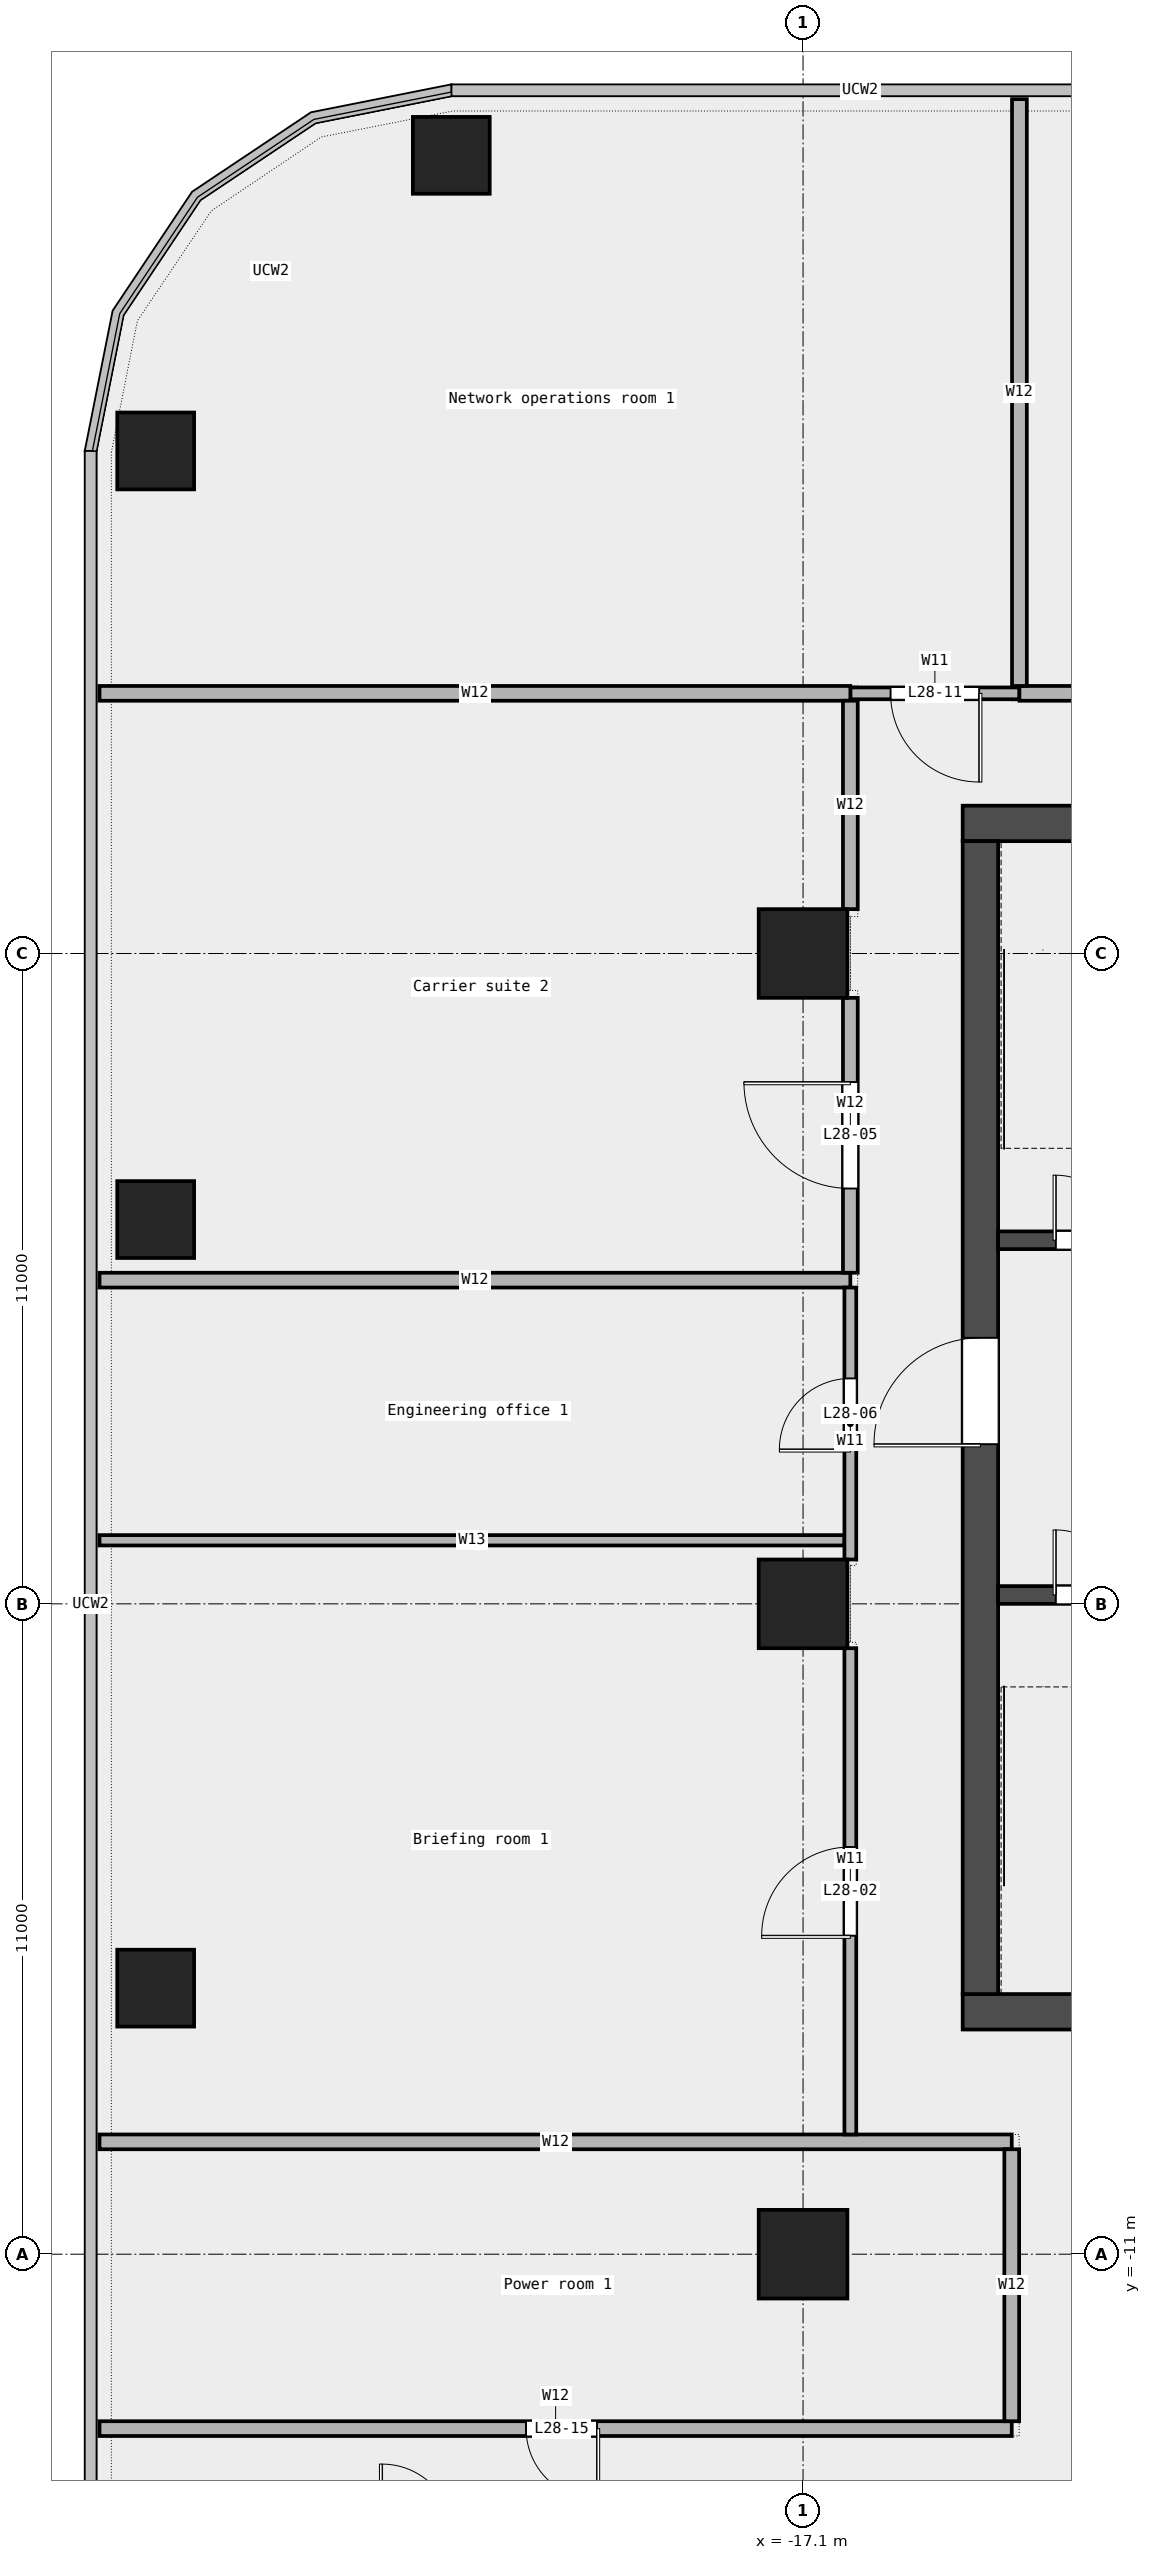
"""IFC4 building model, lengths in metres.
Left out: names, types, materials, properties, quantities, classifications, styles, units other than length and angle.
Written with IfcOpenShell. Run it as: python <this file> out.ifc"""

import sys

from ifc_helpers import new_model, si_unit, direction, frame, frame_2d, origin, origin_2d, place, context, subcontext, project, spatial, rectangle, extrude, element, fill, save


model = new_model("IFC4")
c1 = context("Model", 3, precision=1e-05, world=origin(), true_north=direction((0.0, 1.0)))
c2 = subcontext(c1, "Body", "Model", "MODEL_VIEW")
j1 = project(units=[si_unit("LENGTHUNIT", "METRE"), si_unit("PLANEANGLEUNIT", "RADIAN")], contexts=[c1])
p1 = place(None, origin())
s1 = spatial("IfcSite", under=j1, at=p1, CompositionType="ELEMENT")
p2 = place(p1, origin())
s2 = spatial("IfcBuilding", under=s1, at=p2, CompositionType="ELEMENT")
p3 = place(p2, frame((0.0, 0.0, 139.6)))
s3 = spatial("IfcBuildingStorey", under=s2, at=p3, CompositionType="ELEMENT", Elevation=139.6)
for number, where, z_axis, x_axis in (
    (1, (-23.05, 24.5, 0.0), (0.0, 0.0, 1.0), (1.0, 0.0, 0.0)),
    (2, (-28.05, 19.5, 0.0), (0.0, 0.0, 1.0), (1.0, 0.0, 0.0)),
    (3, (-28.05, 6.5, 0.0), (0.0, 0.0, 1.0), (1.0, 0.0, 0.0)),
    (4, (-28.05, -6.5, 0.0), (0.0, 0.0, 1.0), (1.0, 0.0, 0.0)),
):
    element("IfcColumn", number, at=place(p3, frame(where, z_axis=z_axis, x_axis=x_axis)), inside=s3, PredefinedType="COLUMN", context=c2, shape_type="SweptSolid", body=[
        extrude(rectangle(XDim=1.3, YDim=1.3, at=origin_2d()), origin(), (0.0, 0.0, 1.0), 4.05),
    ])
for number, where, z_axis, x_axis in (
    (5, (-17.1, -11.0, 0.0), (0.0, 0.0, 1.0), (1.0, 0.0, 0.0)),
    (6, (-17.1, 0.0, 0.0), (0.0, 0.0, 1.0), (1.0, 0.0, 0.0)),
    (7, (-17.1, 11.0, 0.0), (0.0, 0.0, 1.0), (1.0, 0.0, 0.0)),
):
    element("IfcColumn", number, at=place(p3, frame(where, z_axis=z_axis, x_axis=x_axis)), inside=s3, PredefinedType="COLUMN", context=c2, shape_type="SweptSolid", body=[
        extrude(rectangle(XDim=1.5, YDim=1.5, at=origin_2d()), origin(), (0.0, 0.0, 1.0), 4.05),
    ])
p4 = place(p3, frame((-29.0, -13.95, 0.0), z_axis=(0.0, 0.0, 1.0), x_axis=(1.0, 0.0, 0.0)))
e8 = element("IfcWall", 8, at=p4, inside=s3, PredefinedType="PARTITIONING", context=c2, shape_type="SweptSolid", body=[
    extrude(rectangle(XDim=15.43, YDim=0.25, at=frame_2d((7.715, 0.0))), origin(), (0.0, 0.0, 1.0), 4.05),
])
p5 = place(p4, frame((7.215, 0.0, 0.0)))
e9 = element("IfcOpeningElement", 9, at=p5, cuts=e8, PredefinedType="OPENING", context=c2, shape_type="SweptSolid", body=[
    extrude(rectangle(XDim=1.2, YDim=2.1, at=frame_2d((0.6, 1.05))), frame((0.0, 0.137, 0.0), z_axis=(0.0, -1.0, 0.0), x_axis=(1.0, 0.0, 0.0)), (0.0, 0.0, 1.0), 0.274),
])
p6 = place(p3, frame((-29.0, -9.1, 0.0), z_axis=(0.0, 0.0, 1.0), x_axis=(1.0, 0.0, 0.0)))
e10 = element("IfcWall", 10, at=p6, inside=s3, PredefinedType="PARTITIONING", context=c2, shape_type="SweptSolid", body=[
    extrude(rectangle(XDim=15.43, YDim=0.25, at=frame_2d((7.715, 0.0))), origin(), (0.0, 0.0, 1.0), 4.05),
])
p7 = place(p3, frame((-29.0, 1.075, 0.0), z_axis=(0.0, 0.0, 1.0), x_axis=(1.0, 0.0, 0.0)))
e11 = element("IfcWall", 11, at=p7, inside=s3, PredefinedType="PARTITIONING", context=c2, shape_type="SweptSolid", body=[
    extrude(rectangle(XDim=12.6, YDim=0.175, at=frame_2d((6.3, 0.0))), origin(), (0.0, 0.0, 1.0), 4.05),
])
p8 = place(p3, frame((-29.0, 5.475, 0.0), z_axis=(0.0, 0.0, 1.0), x_axis=(1.0, 0.0, 0.0)))
e12 = element("IfcWall", 12, at=p8, inside=s3, PredefinedType="PARTITIONING", context=c2, shape_type="SweptSolid", body=[
    extrude(rectangle(XDim=12.7, YDim=0.25, at=frame_2d((6.35, 0.0))), origin(), (0.0, 0.0, 1.0), 4.05),
])
p9 = place(p3, frame((-16.3, 15.4, 0.0), z_axis=(0.0, 0.0, 1.0), x_axis=(1.0, 0.0, 0.0)))
e13 = element("IfcWall", 13, at=p9, inside=s3, PredefinedType="PARTITIONING", context=c2, shape_type="SweptSolid", body=[
    extrude(rectangle(XDim=2.86, YDim=0.2, at=frame_2d((1.43, 0.0))), origin(), (0.0, 0.0, 1.0), 4.05),
])
p10 = place(p9, frame((0.68, 0.0, 0.0)))
e14 = element("IfcOpeningElement", 14, at=p10, cuts=e13, PredefinedType="OPENING", context=c2, shape_type="SweptSolid", body=[
    extrude(rectangle(XDim=1.5, YDim=2.1, at=frame_2d((0.75, 1.05))), frame((0.0, 0.112, 0.0), z_axis=(0.0, -1.0, 0.0), x_axis=(1.0, 0.0, 0.0)), (0.0, 0.0, 1.0), 0.224),
])
p11 = place(p3, frame((-29.0, 15.4, 0.0), z_axis=(0.0, 0.0, 1.0), x_axis=(1.0, 0.0, 0.0)))
e15 = element("IfcWall", 15, at=p11, inside=s3, PredefinedType="PARTITIONING", context=c2, shape_type="SweptSolid", body=[
    extrude(rectangle(XDim=12.7, YDim=0.25, at=frame_2d((6.35, 0.0))), origin(), (0.0, 0.0, 1.0), 4.05),
])
p12 = place(p3, frame((-13.44, 15.4, 0.0), z_axis=(0.0, 0.0, 1.0), x_axis=(1.0, 0.0, 0.0)))
e16 = element("IfcWall", 16, at=p12, inside=s3, PredefinedType="PARTITIONING", context=c2, shape_type="SweptSolid", body=[
    extrude(rectangle(XDim=4.22, YDim=0.25, at=frame_2d((2.11, 0.0))), origin(), (0.0, 0.0, 1.0), 4.05),
])
p13 = place(p12, frame((1.66, 0.0, 0.0)))
e17 = element("IfcOpeningElement", 17, at=p13, cuts=e16, PredefinedType="OPENING", context=c2, shape_type="SweptSolid", body=[
    extrude(rectangle(XDim=0.9, YDim=2.1, at=frame_2d((0.45, 1.05))), frame((0.0, 0.137, 0.0), z_axis=(0.0, -1.0, 0.0), x_axis=(1.0, 0.0, 0.0)), (0.0, 0.0, 1.0), 0.274),
])
p14 = place(p3, frame((-16.3, -8.975, 0.0), z_axis=(0.0, 0.0, 1.0), x_axis=(0.0, 1.0, 0.0)))
e18 = element("IfcWall", 18, at=p14, inside=s3, PredefinedType="PARTITIONING", context=c2, shape_type="SweptSolid", body=[
    extrude(rectangle(XDim=8.225, YDim=0.2, at=frame_2d((4.113, 0.0))), origin(), (0.0, 0.0, 1.0), 4.05),
])
p15 = place(p14, frame((3.363, 0.0, 0.0)))
e19 = element("IfcOpeningElement", 19, at=p15, cuts=e18, PredefinedType="OPENING", context=c2, shape_type="SweptSolid", body=[
    extrude(rectangle(XDim=1.5, YDim=2.1, at=frame_2d((0.75, 1.05))), frame((0.0, 0.112, 0.0), z_axis=(0.0, -1.0, 0.0), x_axis=(1.0, 0.0, 0.0)), (0.0, 0.0, 1.0), 0.224),
])
p16 = place(p3, frame((-16.3, 0.75, 0.0), z_axis=(0.0, 0.0, 1.0), x_axis=(0.0, 1.0, 0.0)))
e20 = element("IfcWall", 20, at=p16, inside=s3, PredefinedType="PARTITIONING", context=c2, shape_type="SweptSolid", body=[
    extrude(rectangle(XDim=4.6, YDim=0.2, at=frame_2d((2.3, 0.0))), origin(), (0.0, 0.0, 1.0), 4.05),
])
p17 = place(p16, frame((1.863, 0.0, 0.0)))
e21 = element("IfcOpeningElement", 21, at=p17, cuts=e20, PredefinedType="OPENING", context=c2, shape_type="SweptSolid", body=[
    extrude(rectangle(XDim=1.2, YDim=2.1, at=frame_2d((0.6, 1.05))), frame((0.0, 0.112, 0.0), z_axis=(0.0, -1.0, 0.0), x_axis=(1.0, 0.0, 0.0)), (0.0, 0.0, 1.0), 0.224),
])
p18 = place(p3, frame((-16.3, 5.6, 0.0), z_axis=(0.0, 0.0, 1.0), x_axis=(0.0, 1.0, 0.0)))
e22 = element("IfcWall", 22, at=p18, inside=s3, PredefinedType="PARTITIONING", context=c2, shape_type="SweptSolid", body=[
    extrude(rectangle(XDim=4.65, YDim=0.25, at=frame_2d((2.325, 0.0))), origin(), (0.0, 0.0, 1.0), 4.05),
])
p19 = place(p18, frame((1.425, 0.0, 0.0)))
e23 = element("IfcOpeningElement", 23, at=p19, cuts=e22, PredefinedType="OPENING", context=c2, shape_type="SweptSolid", body=[
    extrude(rectangle(XDim=1.8, YDim=2.1, at=frame_2d((0.9, 1.05))), frame((0.0, 0.137, 0.0), z_axis=(0.0, -1.0, 0.0), x_axis=(1.0, 0.0, 0.0)), (0.0, 0.0, 1.0), 0.274),
])
p20 = place(p3, frame((-16.3, 11.75, 0.0), z_axis=(0.0, 0.0, 1.0), x_axis=(0.0, 1.0, 0.0)))
e24 = element("IfcWall", 24, at=p20, inside=s3, PredefinedType="PARTITIONING", context=c2, shape_type="SweptSolid", body=[
    extrude(rectangle(XDim=3.525, YDim=0.25, at=frame_2d((1.762, 0.0))), origin(), (0.0, 0.0, 1.0), 4.05),
])
p21 = place(p3, frame((-13.57, -13.825, 0.0), z_axis=(0.0, 0.0, 1.0), x_axis=(0.0, 1.0, 0.0)))
e25 = element("IfcWall", 25, at=p21, inside=s3, PredefinedType="PARTITIONING", context=c2, shape_type="SweptSolid", body=[
    extrude(rectangle(XDim=4.6, YDim=0.25, at=frame_2d((2.3, 0.0))), origin(), (0.0, 0.0, 1.0), 4.05),
])
p22 = place(p3, frame((-13.44, 15.525, 0.0), z_axis=(0.0, 0.0, 1.0), x_axis=(0.0, 1.0, 0.0)))
e26 = element("IfcWall", 26, at=p22, inside=s3, PredefinedType="PARTITIONING", context=c2, shape_type="SweptSolid", body=[
    extrude(rectangle(XDim=9.925, YDim=0.25, at=frame_2d((4.962, 0.0))), origin(), (0.0, 0.0, 1.0), 4.05),
])
p23 = place(p3, frame((-14.4, -6.9, 0.0), z_axis=(0.0, 0.0, 1.0), x_axis=(1.0, 0.0, 0.0)))
e27 = element("IfcWall", 27, at=p23, inside=s3, PredefinedType="SHEAR", context=c2, shape_type="SweptSolid", body=[
    extrude(rectangle(XDim=28.8, YDim=0.6, at=frame_2d((14.4, 0.0))), origin(), (0.0, 0.0, 1.0), 4.2),
])
p24 = place(p23, frame((4.9, 0.0, 0.0)))
e28 = element("IfcOpeningElement", 28, at=p24, cuts=e27, PredefinedType="OPENING", context=c2, shape_type="SweptSolid", body=[
    extrude(rectangle(XDim=1.0, YDim=2.1, at=frame_2d((0.5, 1.05))), frame((0.0, 0.312, 0.0), z_axis=(0.0, -1.0, 0.0), x_axis=(1.0, 0.0, 0.0)), (0.0, 0.0, 1.0), 0.624),
])
p25 = place(p23, frame((9.3, 0.0, 0.0)))
e29 = element("IfcOpeningElement", 29, at=p25, cuts=e27, PredefinedType="OPENING", context=c2, shape_type="SweptSolid", body=[
    extrude(rectangle(XDim=1.2, YDim=2.1, at=frame_2d((0.6, 1.05))), frame((0.0, 0.312, 0.0), z_axis=(0.0, -1.0, 0.0), x_axis=(1.0, 0.0, 0.0)), (0.0, 0.0, 1.0), 0.624),
])
p26 = place(p23, frame((14.462, 0.0, 0.0)))
e30 = element("IfcOpeningElement", 30, at=p26, cuts=e27, PredefinedType="OPENING", context=c2, shape_type="SweptSolid", body=[
    extrude(rectangle(XDim=1.0, YDim=2.1, at=frame_2d((0.5, 1.05))), frame((0.0, 0.312, 0.0), z_axis=(0.0, -1.0, 0.0), x_axis=(1.0, 0.0, 0.0)), (0.0, 0.0, 1.0), 0.624),
])
p27 = place(p23, frame((18.75, 0.0, 0.0)))
e31 = element("IfcOpeningElement", 31, at=p27, cuts=e27, PredefinedType="OPENING", context=c2, shape_type="SweptSolid", body=[
    extrude(rectangle(XDim=1.8, YDim=2.1, at=frame_2d((0.9, 1.05))), frame((0.0, 0.312, 0.0), z_axis=(0.0, -1.0, 0.0), x_axis=(1.0, 0.0, 0.0)), (0.0, 0.0, 1.0), 0.624),
])
p28 = place(p23, frame((23.087, 0.0, 0.0)))
e32 = element("IfcOpeningElement", 32, at=p28, cuts=e27, PredefinedType="OPENING", context=c2, shape_type="SweptSolid", body=[
    extrude(rectangle(XDim=1.0, YDim=2.1, at=frame_2d((0.5, 1.05))), frame((0.0, 0.312, 0.0), z_axis=(0.0, -1.0, 0.0), x_axis=(1.0, 0.0, 0.0)), (0.0, 0.0, 1.0), 0.624),
])
p29 = place(p3, frame((-14.4, 13.2, 0.0), z_axis=(0.0, 0.0, 1.0), x_axis=(1.0, 0.0, 0.0)))
e33 = element("IfcWall", 33, at=p29, inside=s3, PredefinedType="SHEAR", context=c2, shape_type="SweptSolid", body=[
    extrude(rectangle(XDim=28.8, YDim=0.6, at=frame_2d((14.4, 0.0))), origin(), (0.0, 0.0, 1.0), 4.2),
])
p30 = place(p29, frame((6.775, 0.0, 0.0)))
e34 = element("IfcOpeningElement", 34, at=p30, cuts=e33, PredefinedType="OPENING", context=c2, shape_type="SweptSolid", body=[
    extrude(rectangle(XDim=1.0, YDim=2.1, at=frame_2d((0.5, 1.05))), frame((0.0, 0.312, 0.0), z_axis=(0.0, -1.0, 0.0), x_axis=(1.0, 0.0, 0.0)), (0.0, 0.0, 1.0), 0.624),
])
p31 = place(p29, frame((13.525, 0.0, 0.0)))
e35 = element("IfcOpeningElement", 35, at=p31, cuts=e33, PredefinedType="OPENING", context=c2, shape_type="SweptSolid", body=[
    extrude(rectangle(XDim=1.0, YDim=2.1, at=frame_2d((0.5, 1.05))), frame((0.0, 0.312, 0.0), z_axis=(0.0, -1.0, 0.0), x_axis=(1.0, 0.0, 0.0)), (0.0, 0.0, 1.0), 0.624),
])
p32 = place(p29, frame((20.65, 0.0, 0.0)))
e36 = element("IfcOpeningElement", 36, at=p32, cuts=e33, PredefinedType="OPENING", context=c2, shape_type="SweptSolid", body=[
    extrude(rectangle(XDim=1.0, YDim=2.1, at=frame_2d((0.5, 1.05))), frame((0.0, 0.312, 0.0), z_axis=(0.0, -1.0, 0.0), x_axis=(1.0, 0.0, 0.0)), (0.0, 0.0, 1.0), 0.624),
])
p33 = place(p3, frame((-14.1, -6.6, 0.0), z_axis=(0.0, 0.0, 1.0), x_axis=(0.0, 1.0, 0.0)))
e37 = element("IfcWall", 37, at=p33, inside=s3, PredefinedType="SHEAR", context=c2, shape_type="SweptSolid", body=[
    extrude(rectangle(XDim=19.5, YDim=0.6, at=frame_2d((9.75, 0.0))), origin(), (0.0, 0.0, 1.0), 4.2),
])
p34 = place(p33, frame((9.3, 0.0, 0.0)))
e38 = element("IfcOpeningElement", 38, at=p34, cuts=e37, PredefinedType="OPENING", context=c2, shape_type="SweptSolid", body=[
    extrude(rectangle(XDim=1.8, YDim=2.1, at=frame_2d((0.9, 1.05))), frame((0.0, 0.312, 0.0), z_axis=(0.0, -1.0, 0.0), x_axis=(1.0, 0.0, 0.0)), (0.0, 0.0, 1.0), 0.624),
])
p35 = place(p3, frame((-13.8, 0.15, 0.0), z_axis=(0.0, 0.0, 1.0), x_axis=(1.0, 0.0, 0.0)))
e39 = element("IfcWall", 39, at=p35, inside=s3, PredefinedType="SOLIDWALL", context=c2, shape_type="SweptSolid", body=[
    extrude(rectangle(XDim=3.15, YDim=0.3, at=frame_2d((1.575, 0.0))), origin(), (0.0, 0.0, 1.0), 4.2),
])
p36 = place(p35, frame((0.975, 0.0, 0.0)))
e40 = element("IfcOpeningElement", 40, at=p36, cuts=e39, PredefinedType="OPENING", context=c2, shape_type="SweptSolid", body=[
    extrude(rectangle(XDim=1.1, YDim=2.1, at=frame_2d((0.55, 1.05))), frame((0.0, 0.162, 0.0), z_axis=(0.0, -1.0, 0.0), x_axis=(1.0, 0.0, 0.0)), (0.0, 0.0, 1.0), 0.324),
])
p37 = place(p3, frame((-13.8, 6.15, 0.0), z_axis=(0.0, 0.0, 1.0), x_axis=(1.0, 0.0, 0.0)))
e41 = element("IfcWall", 41, at=p37, inside=s3, PredefinedType="SOLIDWALL", context=c2, shape_type="SweptSolid", body=[
    extrude(rectangle(XDim=3.15, YDim=0.3, at=frame_2d((1.575, 0.0))), origin(), (0.0, 0.0, 1.0), 4.2),
])
p38 = place(p37, frame((0.975, 0.0, 0.0)))
e42 = element("IfcOpeningElement", 42, at=p38, cuts=e41, PredefinedType="OPENING", context=c2, shape_type="SweptSolid", body=[
    extrude(rectangle(XDim=1.1, YDim=2.1, at=frame_2d((0.55, 1.05))), frame((0.0, 0.162, 0.0), z_axis=(0.0, -1.0, 0.0), x_axis=(1.0, 0.0, 0.0)), (0.0, 0.0, 1.0), 0.324),
])
p39 = place(p15, origin())
e43 = element("IfcDoor", 43, at=p39, inside=s3, OperationType="DOUBLE_DOOR_SINGLE_SWING", PredefinedType="DOOR", context=c2, shape_type="SweptSolid", body=[
    extrude(rectangle(XDim=1.5, YDim=2.1, at=frame_2d((0.75, 1.05))), frame((0.0, 0.025, 0.0), z_axis=(0.0, -1.0, 0.0), x_axis=(1.0, 0.0, 0.0)), (0.0, 0.0, 1.0), 0.05),
])
fill(e19, e43)
p40 = place(p19, origin())
e44 = element("IfcDoor", 44, at=p40, inside=s3, OperationType="DOUBLE_DOOR_SINGLE_SWING", PredefinedType="DOOR", context=c2, shape_type="SweptSolid", body=[
    extrude(rectangle(XDim=1.8, YDim=2.1, at=frame_2d((0.9, 1.05))), frame((0.0, 0.025, 0.0), z_axis=(0.0, -1.0, 0.0), x_axis=(1.0, 0.0, 0.0)), (0.0, 0.0, 1.0), 0.05),
])
fill(e23, e44)
p41 = place(p17, origin())
e45 = element("IfcDoor", 45, at=p41, inside=s3, OperationType="SINGLE_SWING_LEFT", PredefinedType="DOOR", context=c2, shape_type="SweptSolid", body=[
    extrude(rectangle(XDim=1.2, YDim=2.1, at=frame_2d((0.6, 1.05))), frame((0.0, 0.025, 0.0), z_axis=(0.0, -1.0, 0.0), x_axis=(1.0, 0.0, 0.0)), (0.0, 0.0, 1.0), 0.05),
])
fill(e21, e45)
p42 = place(p10, origin())
e46 = element("IfcDoor", 46, at=p42, inside=s3, OperationType="DOUBLE_DOOR_SINGLE_SWING", PredefinedType="DOOR", context=c2, shape_type="SweptSolid", body=[
    extrude(rectangle(XDim=1.5, YDim=2.1, at=frame_2d((0.75, 1.05))), frame((0.0, 0.025, 0.0), z_axis=(0.0, -1.0, 0.0), x_axis=(1.0, 0.0, 0.0)), (0.0, 0.0, 1.0), 0.05),
])
fill(e14, e46)
p43 = place(p5, origin())
e47 = element("IfcDoor", 47, at=p43, inside=s3, OperationType="SINGLE_SWING_LEFT", PredefinedType="DOOR", context=c2, shape_type="SweptSolid", body=[
    extrude(rectangle(XDim=1.2, YDim=2.1, at=frame_2d((0.6, 1.05))), frame((0.0, 0.025, 0.0), z_axis=(0.0, -1.0, 0.0), x_axis=(1.0, 0.0, 0.0)), (0.0, 0.0, 1.0), 0.05),
])
fill(e9, e47)
p44 = place(p36, origin())
e48 = element("IfcDoor", 48, at=p44, inside=s3, OperationType="SINGLE_SWING_LEFT", PredefinedType="DOOR", context=c2, shape_type="SweptSolid", body=[
    extrude(rectangle(XDim=1.1, YDim=2.1, at=frame_2d((0.55, 1.05))), frame((0.0, 0.025, 0.0), z_axis=(0.0, -1.0, 0.0), x_axis=(1.0, 0.0, 0.0)), (0.0, 0.0, 1.0), 0.05),
])
fill(e40, e48)
p45 = place(p38, origin())
e49 = element("IfcDoor", 49, at=p45, inside=s3, OperationType="SINGLE_SWING_LEFT", PredefinedType="DOOR", context=c2, shape_type="SweptSolid", body=[
    extrude(rectangle(XDim=1.1, YDim=2.1, at=frame_2d((0.55, 1.05))), frame((0.0, 0.025, 0.0), z_axis=(0.0, -1.0, 0.0), x_axis=(1.0, 0.0, 0.0)), (0.0, 0.0, 1.0), 0.05),
])
fill(e42, e49)
p46 = place(p34, origin())
e50 = element("IfcDoor", 50, at=p46, inside=s3, OperationType="DOUBLE_DOOR_SINGLE_SWING", PredefinedType="DOOR", context=c2, shape_type="SweptSolid", body=[
    extrude(rectangle(XDim=1.8, YDim=2.1, at=frame_2d((0.9, 1.05))), frame((0.0, 0.025, 0.0), z_axis=(0.0, -1.0, 0.0), x_axis=(1.0, 0.0, 0.0)), (0.0, 0.0, 1.0), 0.05),
])
fill(e38, e50)
save(model, sys.argv[1])
